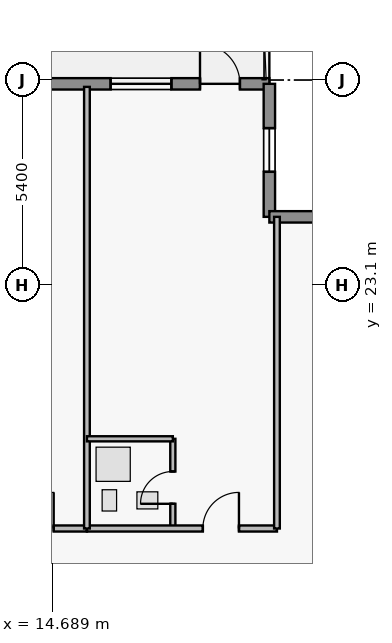
"""IFC4 building model, lengths in metres.
Left out: names, types, materials, properties, quantities, classifications, styles, units other than length and angle.
Written with IfcOpenShell. Run it as: python <this file> out.ifc"""

import sys

from ifc_helpers import new_model, si_unit, direction, frame, frame_2d, origin, place, context, subcontext, project, spatial, rectangle, extrude, element, fill, save


model = new_model("IFC4")
c1 = context("Model", 3, precision=1e-05, world=origin(), true_north=direction((0.0, 1.0)))
c2 = subcontext(c1, "Body", "Model", "MODEL_VIEW")
j1 = project(units=[si_unit("LENGTHUNIT", "METRE"), si_unit("PLANEANGLEUNIT", "RADIAN")], contexts=[c1])
p1 = place(None, origin())
s1 = spatial("IfcSite", under=j1, at=p1, CompositionType="ELEMENT")
p2 = place(p1, origin())
s2 = spatial("IfcBuilding", under=s1, at=p2, CompositionType="ELEMENT")
p3 = place(p2, frame((0.0, 0.0, 150.4)))
s3 = spatial("IfcBuildingStorey", under=s2, at=p3, CompositionType="ELEMENT", Elevation=150.4)
p4 = place(p3, frame((10.15, 28.4, 0.0), z_axis=(0.0, 0.0, 1.0), x_axis=(1.0, 0.0, 0.0)))
e1 = element("IfcWall", 1, at=p4, inside=s3, PredefinedType="STANDARD", context=c2, shape_type="SweptSolid", body=[
    extrude(rectangle(XDim=10.25, YDim=0.3, at=frame_2d((5.125, 0.0))), origin(), (0.0, 0.0, 1.0), 3.43),
])
p5 = place(p4, frame((8.425, 0.0, 0.0)))
e2 = element("IfcOpeningElement", 2, at=p5, cuts=e1, PredefinedType="OPENING", context=c2, shape_type="SweptSolid", body=[
    extrude(rectangle(XDim=1.05, YDim=2.2, at=frame_2d((0.525, 1.1))), frame((0.0, 0.16, 0.0), z_axis=(0.0, -1.0, 0.0), x_axis=(1.0, 0.0, 0.0)), (0.0, 0.0, 1.0), 0.32),
])
p6 = place(p4, frame((0.96, 0.0, 0.85)))
e3 = element("IfcOpeningElement", 3, at=p6, cuts=e1, PredefinedType="OPENING", context=c2, shape_type="SweptSolid", body=[
    extrude(rectangle(XDim=1.6, YDim=1.8, at=frame_2d((0.8, 0.9))), frame((0.0, 0.16, 0.0), z_axis=(0.0, -1.0, 0.0), x_axis=(1.0, 0.0, 0.0)), (0.0, 0.0, 1.0), 0.32),
])
p7 = place(p4, frame((6.073, 0.0, 0.85)))
e4 = element("IfcOpeningElement", 4, at=p7, cuts=e1, PredefinedType="OPENING", context=c2, shape_type="SweptSolid", body=[
    extrude(rectangle(XDim=1.6, YDim=1.8, at=frame_2d((0.8, 0.9))), frame((0.0, 0.16, 0.0), z_axis=(0.0, -1.0, 0.0), x_axis=(1.0, 0.0, 0.0)), (0.0, 0.0, 1.0), 0.32),
])
p8 = place(p3, frame((20.4, 28.4, 0.0), z_axis=(0.0, 0.0, 1.0), x_axis=(0.0, -1.0, 0.0)))
e5 = element("IfcWall", 5, at=p8, inside=s3, PredefinedType="STANDARD", context=c2, shape_type="SweptSolid", body=[
    extrude(rectangle(XDim=3.5, YDim=0.3, at=frame_2d((1.75, 0.0))), origin(), (0.0, 0.0, 1.0), 3.43),
])
p9 = place(p8, frame((1.165, 0.0, 1.25)))
e6 = element("IfcOpeningElement", 6, at=p9, cuts=e5, PredefinedType="OPENING", context=c2, shape_type="SweptSolid", body=[
    extrude(rectangle(XDim=1.15, YDim=1.55, at=frame_2d((0.575, 0.775))), frame((0.0, 0.16, 0.0), z_axis=(0.0, -1.0, 0.0), x_axis=(1.0, 0.0, 0.0)), (0.0, 0.0, 1.0), 0.32),
])
p10 = place(p3, frame((20.4, 24.9, 0.0), z_axis=(0.0, 0.0, 1.0), x_axis=(1.0, 0.0, 0.0)))
e7 = element("IfcWall", 7, at=p10, inside=s3, PredefinedType="STANDARD", context=c2, shape_type="SweptSolid", body=[
    extrude(rectangle(XDim=3.5, YDim=0.3, at=frame_2d((1.75, 0.0))), origin(), (0.0, 0.0, 1.0), 3.43),
])
p11 = place(p10, frame((1.285, 0.0, 1.25)))
e8 = element("IfcOpeningElement", 8, at=p11, cuts=e7, PredefinedType="OPENING", context=c2, shape_type="SweptSolid", body=[
    extrude(rectangle(XDim=1.15, YDim=1.55, at=frame_2d((0.575, 0.775))), frame((0.0, 0.16, 0.0), z_axis=(0.0, -1.0, 0.0), x_axis=(1.0, 0.0, 0.0)), (0.0, 0.0, 1.0), 0.32),
])
p12 = place(p3, frame((10.6, 16.7, 0.0), z_axis=(0.0, 0.0, 1.0), x_axis=(1.0, 0.0, 0.0)))
e9 = element("IfcWall", 9, at=p12, inside=s3, PredefinedType="PARTITIONING", context=c2, shape_type="SweptSolid", body=[
    extrude(rectangle(XDim=5.0, YDim=0.16, at=frame_2d((2.5, 0.0))), origin(), (0.0, 0.0, 1.0), 2.973),
])
p13 = place(p12, frame((3.175, 0.0, 0.0)))
e10 = element("IfcOpeningElement", 10, at=p13, cuts=e9, PredefinedType="OPENING", context=c2, shape_type="SweptSolid", body=[
    extrude(rectangle(XDim=0.95, YDim=2.15, at=frame_2d((0.475, 1.075))), frame((0.0, 0.09, 0.0), z_axis=(0.0, -1.0, 0.0), x_axis=(1.0, 0.0, 0.0)), (0.0, 0.0, 1.0), 0.18),
])
p14 = place(p3, frame((17.86, 16.7, 0.0), z_axis=(0.0, 0.0, 1.0), x_axis=(0.0, 1.0, 0.0)))
e11 = element("IfcWall", 11, at=p14, inside=s3, PredefinedType="PLUMBINGWALL", context=c2, shape_type="SweptSolid", body=[
    extrude(rectangle(XDim=2.36, YDim=0.135, at=frame_2d((1.18, 0.0))), origin(), (0.0, 0.0, 1.0), 3.43),
])
p15 = place(p14, frame((0.65, 0.0, 0.0)))
e12 = element("IfcOpeningElement", 12, at=p15, cuts=e11, PredefinedType="OPENING", context=c2, shape_type="SweptSolid", body=[
    extrude(rectangle(XDim=0.85, YDim=2.1, at=frame_2d((0.425, 1.05))), frame((0.0, 0.077, 0.0), z_axis=(0.0, -1.0, 0.0), x_axis=(1.0, 0.0, 0.0)), (0.0, 0.0, 1.0), 0.155),
])
p16 = place(p3, frame((15.6, 16.7, 0.0), z_axis=(0.0, 0.0, 1.0), x_axis=(1.0, 0.0, 0.0)))
e13 = element("IfcWall", 13, at=p16, inside=s3, PredefinedType="PARTITIONING", context=c2, shape_type="SweptSolid", body=[
    extrude(rectangle(XDim=5.0, YDim=0.16, at=frame_2d((2.5, 0.0))), origin(), (0.0, 0.0, 1.0), 3.43),
])
p17 = place(p16, frame((3.05, 0.0, 0.0)))
e14 = element("IfcOpeningElement", 14, at=p17, cuts=e13, PredefinedType="OPENING", context=c2, shape_type="SweptSolid", body=[
    extrude(rectangle(XDim=0.95, YDim=2.15, at=frame_2d((0.475, 1.075))), frame((0.0, 0.09, 0.0), z_axis=(0.0, -1.0, 0.0), x_axis=(1.0, 0.0, 0.0)), (0.0, 0.0, 1.0), 0.18),
])
p18 = place(p3, frame((15.6, 16.7, 0.0), z_axis=(0.0, 0.0, 1.0), x_axis=(0.0, 1.0, 0.0)))
e15 = element("IfcWall", 15, at=p18, inside=s3, PredefinedType="PARTITIONING", context=c2, shape_type="SweptSolid", body=[
    extrude(rectangle(XDim=11.62, YDim=0.15, at=frame_2d((5.81, 0.0))), origin(), (0.0, 0.0, 1.0), 3.43),
])
p19 = place(p3, frame((15.6, 19.06, 0.0), z_axis=(0.0, 0.0, 1.0), x_axis=(1.0, 0.0, 0.0)))
e16 = element("IfcWall", 16, at=p19, inside=s3, PredefinedType="PLUMBINGWALL", context=c2, shape_type="SweptSolid", body=[
    extrude(rectangle(XDim=2.26, YDim=0.135, at=frame_2d((1.13, 0.0))), origin(), (0.0, 0.0, 1.0), 3.43),
])
p20 = place(p3, frame((20.6, 16.7, 0.0), z_axis=(0.0, 0.0, 1.0), x_axis=(0.0, 1.0, 0.0)))
e17 = element("IfcWall", 17, at=p20, inside=s3, PredefinedType="PARTITIONING", context=c2, shape_type="SweptSolid", body=[
    extrude(rectangle(XDim=8.2, YDim=0.15, at=frame_2d((4.1, 0.0))), origin(), (0.0, 0.0, 1.0), 3.43),
])
p21 = place(p5, origin())
e18 = element("IfcDoor", 18, at=p21, inside=s3, OperationType="SINGLE_SWING_LEFT", PredefinedType="DOOR", context=c2, shape_type="SweptSolid", body=[
    extrude(rectangle(XDim=1.05, YDim=2.2, at=frame_2d((0.525, 1.1))), frame((0.0, 0.025, 0.0), z_axis=(0.0, -1.0, 0.0), x_axis=(1.0, 0.0, 0.0)), (0.0, 0.0, 1.0), 0.05),
])
fill(e2, e18)
p22 = place(p7, origin())
e19 = element("IfcWindow", 19, at=p22, inside=s3, PartitioningType="SINGLE_PANEL", PredefinedType="WINDOW", context=c2, shape_type="SweptSolid", body=[
    extrude(rectangle(XDim=1.6, YDim=1.8, at=frame_2d((0.8, 0.9))), frame((0.0, 0.03, 0.0), z_axis=(0.0, -1.0, 0.0), x_axis=(1.0, 0.0, 0.0)), (0.0, 0.0, 1.0), 0.06),
])
fill(e4, e19)
p23 = place(p9, origin())
e20 = element("IfcWindow", 20, at=p23, inside=s3, PartitioningType="SINGLE_PANEL", PredefinedType="WINDOW", context=c2, shape_type="SweptSolid", body=[
    extrude(rectangle(XDim=1.15, YDim=1.55, at=frame_2d((0.575, 0.775))), frame((0.0, 0.03, 0.0), z_axis=(0.0, -1.0, 0.0), x_axis=(1.0, 0.0, 0.0)), (0.0, 0.0, 1.0), 0.06),
])
fill(e6, e20)
p24 = place(p13, origin())
e21 = element("IfcDoor", 21, at=p24, inside=s3, OperationType="SINGLE_SWING_RIGHT", PredefinedType="DOOR", context=c2, shape_type="SweptSolid", body=[
    extrude(rectangle(XDim=0.95, YDim=2.15, at=frame_2d((0.475, 1.075))), frame((0.0, 0.025, 0.0), z_axis=(0.0, -1.0, 0.0), x_axis=(1.0, 0.0, 0.0)), (0.0, 0.0, 1.0), 0.05),
])
fill(e10, e21)
p25 = place(p15, origin())
e22 = element("IfcDoor", 22, at=p25, inside=s3, OperationType="SINGLE_SWING_LEFT", PredefinedType="DOOR", context=c2, shape_type="SweptSolid", body=[
    extrude(rectangle(XDim=0.85, YDim=2.1, at=frame_2d((0.425, 1.05))), frame((0.0, 0.025, 0.0), z_axis=(0.0, -1.0, 0.0), x_axis=(1.0, 0.0, 0.0)), (0.0, 0.0, 1.0), 0.05),
])
fill(e12, e22)
p26 = place(p17, origin())
e23 = element("IfcDoor", 23, at=p26, inside=s3, OperationType="SINGLE_SWING_RIGHT", PredefinedType="DOOR", context=c2, shape_type="SweptSolid", body=[
    extrude(rectangle(XDim=0.95, YDim=2.15, at=frame_2d((0.475, 1.075))), frame((0.0, 0.025, 0.0), z_axis=(0.0, -1.0, 0.0), x_axis=(1.0, 0.0, 0.0)), (0.0, 0.0, 1.0), 0.05),
])
fill(e14, e23)
save(model, sys.argv[1])
